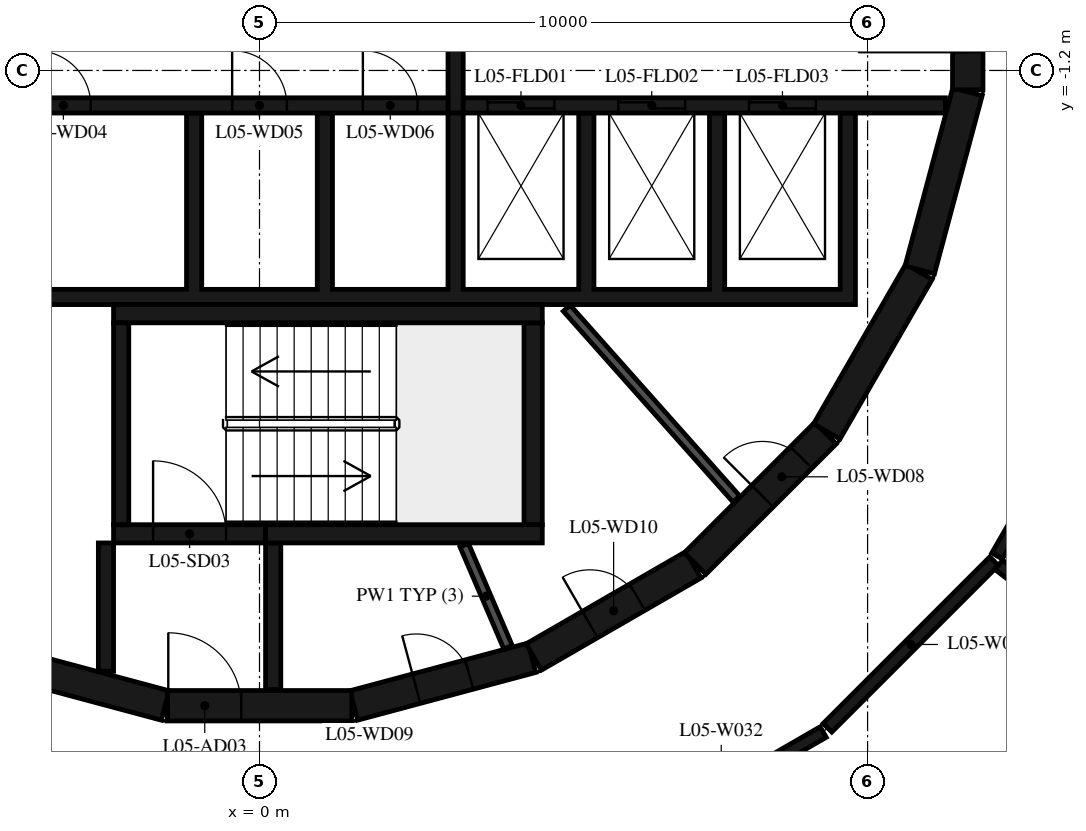
"""IFC4 building model, lengths in metres.
Left out: names, types, materials, properties, quantities, classifications, styles, units other than length and angle.
Written with IfcOpenShell. Run it as: python <this file> out.ifc"""

import sys

from ifc_helpers import new_model, si_unit, direction, frame, frame_2d, origin, place, context, subcontext, project, spatial, polyline, rectangle, outline, extrude, element, fill, save


model = new_model("IFC4")
c1 = context("Model", 3, precision=1e-05, world=origin(), true_north=direction((0.0, 1.0)))
c2 = subcontext(c1, "Body", "Model", "MODEL_VIEW")
j1 = project(units=[si_unit("LENGTHUNIT", "METRE"), si_unit("PLANEANGLEUNIT", "RADIAN")], contexts=[c1])
p1 = place(None, origin())
s1 = spatial("IfcSite", under=j1, at=p1, CompositionType="ELEMENT")
p2 = place(p1, origin())
s2 = spatial("IfcBuilding", under=s1, at=p2, CompositionType="ELEMENT")
p3 = place(p2, frame((0.0, 0.0, 28.2)))
s3 = spatial("IfcBuildingStorey", under=s2, at=p3, CompositionType="ELEMENT", Elevation=28.2)
p4 = place(p3, frame((1.55, -11.643, 0.0), z_axis=(0.0, 0.0, 1.0), x_axis=(0.965948410781, 0.258734743916, 0.0)))
e1 = element("IfcWall", 1, at=p4, inside=s3, PredefinedType="SHEAR", context=c2, shape_type="SweptSolid", body=[
    extrude(rectangle(XDim=3.033, YDim=0.5, at=frame_2d((1.516, 0.0))), origin(), (0.0, 0.0, 1.0), 4.35),
])
p5 = place(p4, frame((1.066, 0.0, 0.0)))
e2 = element("IfcOpeningElement", 2, at=p5, cuts=e1, PredefinedType="OPENING", context=c2, shape_type="SweptSolid", body=[
    extrude(rectangle(XDim=0.9, YDim=2.1, at=frame_2d((0.45, 1.05))), frame((0.0, 0.26, 0.0), z_axis=(0.0, -1.0, 0.0), x_axis=(1.0, 0.0, 0.0)), (0.0, 0.0, 1.0), 0.52),
])
p6 = place(p3, frame((4.51, -10.845, 0.0), z_axis=(0.0, 0.0, 1.0), x_axis=(0.865975092491, 0.500087131594, 0.0)))
e3 = element("IfcWall", 3, at=p6, inside=s3, PredefinedType="SHEAR", context=c2, shape_type="SweptSolid", body=[
    extrude(rectangle(XDim=3.033, YDim=0.5, at=frame_2d((1.516, 0.0))), origin(), (0.0, 0.0, 1.0), 4.35),
])
p7 = place(p6, frame((1.066, 0.0, 0.0)))
e4 = element("IfcOpeningElement", 4, at=p7, cuts=e3, PredefinedType="OPENING", context=c2, shape_type="SweptSolid", body=[
    extrude(rectangle(XDim=0.9, YDim=2.1, at=frame_2d((0.45, 1.05))), frame((0.0, 0.26, 0.0), z_axis=(0.0, -1.0, 0.0), x_axis=(1.0, 0.0, 0.0)), (0.0, 0.0, 1.0), 0.52),
])
p8 = place(p3, frame((7.164, -9.308, 0.0), z_axis=(0.0, 0.0, 1.0), x_axis=(0.707106781187, 0.707106781187, 0.0)))
e5 = element("IfcWall", 5, at=p8, inside=s3, PredefinedType="SHEAR", context=c2, shape_type="SweptSolid", body=[
    extrude(rectangle(XDim=3.032, YDim=0.5, at=frame_2d((1.516, 0.0))), origin(), (0.0, 0.0, 1.0), 4.35),
])
p9 = place(p8, frame((1.566, 0.0, 0.0)))
e6 = element("IfcOpeningElement", 6, at=p9, cuts=e5, PredefinedType="OPENING", context=c2, shape_type="SweptSolid", body=[
    extrude(rectangle(XDim=0.9, YDim=2.1, at=frame_2d((0.45, 1.05))), frame((0.0, 0.26, 0.0), z_axis=(0.0, -1.0, 0.0), x_axis=(1.0, 0.0, 0.0)), (0.0, 0.0, 1.0), 0.52),
])
for number, where, z_axis, x_axis in (
    (7, (9.329, -7.137, 0.0), (0.0, 0.0, 1.0), (0.5, 0.866, 0.0)),
    (8, (10.858, -4.479, 0.0), (0.0, 0.0, 1.0), (0.259, 0.966, 0.0)),
):
    element("IfcWall", number, at=place(p3, frame(where, z_axis=z_axis, x_axis=x_axis)), inside=s3, PredefinedType="SHEAR", context=c2, shape_type="SweptSolid", body=[
        extrude(rectangle(XDim=3.033, YDim=0.5, at=frame_2d((1.516, 0.0))), origin(), (0.0, 0.0, 1.0), 4.35),
    ])
p10 = place(p3, frame((11.647, -1.516, 0.0), z_axis=(0.0, 0.0, 1.0), x_axis=(0.0, 1.0, 0.0)))
e9 = element("IfcWall", 9, at=p10, inside=s3, PredefinedType="SHEAR", context=c2, shape_type="SweptSolid", body=[
    extrude(rectangle(XDim=3.033, YDim=0.5, at=frame_2d((1.516, 0.0))), origin(), (0.0, 0.0, 1.0), 4.35),
])
p11 = place(p10, frame((0.616, 0.0, 0.0)))
e10 = element("IfcOpeningElement", 10, at=p11, cuts=e9, PredefinedType="OPENING", context=c2, shape_type="SweptSolid", body=[
    extrude(rectangle(XDim=1.8, YDim=2.1, at=frame_2d((0.9, 1.05))), frame((0.0, 0.26, 0.0), z_axis=(0.0, -1.0, 0.0), x_axis=(1.0, 0.0, 0.0)), (0.0, 0.0, 1.0), 0.52),
])
p12 = place(p3, frame((-4.479, -10.858, 0.0), z_axis=(0.0, 0.0, 1.0), x_axis=(0.965948410781, -0.258734743916, 0.0)))
e11 = element("IfcWall", 11, at=p12, inside=s3, PredefinedType="SHEAR", context=c2, shape_type="SweptSolid", body=[
    extrude(rectangle(XDim=3.033, YDim=0.5, at=frame_2d((1.516, 0.0))), origin(), (0.0, 0.0, 1.0), 4.35),
])
p13 = place(p3, frame((-1.516, -11.647, 0.0), z_axis=(0.0, 0.0, 1.0), x_axis=(1.0, 0.0, 0.0)))
e12 = element("IfcWall", 12, at=p13, inside=s3, PredefinedType="SHEAR", context=c2, shape_type="SweptSolid", body=[
    extrude(rectangle(XDim=3.033, YDim=0.5, at=frame_2d((1.516, 0.0))), origin(), (0.0, 0.0, 1.0), 4.35),
])
p14 = place(p13, frame((0.016, 0.0, 0.0)))
e13 = element("IfcOpeningElement", 13, at=p14, cuts=e12, PredefinedType="OPENING", context=c2, shape_type="SweptSolid", body=[
    extrude(rectangle(XDim=1.2, YDim=2.1, at=frame_2d((0.6, 1.05))), frame((0.0, 0.26, 0.0), z_axis=(0.0, -1.0, 0.0), x_axis=(1.0, 0.0, 0.0)), (0.0, 0.0, 1.0), 0.52),
])
p15 = place(p3, frame((-2.275, -8.67, 0.0), z_axis=(0.0, 0.0, 1.0), x_axis=(0.0, 1.0, 0.0)))
e14 = element("IfcWall", 14, at=p15, inside=s3, PredefinedType="SHEAR", context=c2, shape_type="SweptSolid", body=[
    extrude(rectangle(XDim=3.32, YDim=0.25, at=frame_2d((1.66, 0.0))), origin(), (0.0, 0.0, 1.0), 4.35),
])
p16 = place(p3, frame((-2.4, -5.2, 0.0), z_axis=(0.0, 0.0, 1.0), x_axis=(1.0, 0.0, 0.0)))
e15 = element("IfcWall", 15, at=p16, inside=s3, PredefinedType="SHEAR", context=c2, shape_type="SweptSolid", body=[
    extrude(rectangle(XDim=7.05, YDim=0.3, at=frame_2d((3.525, 0.0))), origin(), (0.0, 0.0, 1.0), 4.35),
])
p17 = place(p3, frame((4.5, -8.67, 0.0), z_axis=(0.0, 0.0, 1.0), x_axis=(0.0, 1.0, 0.0)))
e16 = element("IfcWall", 16, at=p17, inside=s3, PredefinedType="SHEAR", context=c2, shape_type="SweptSolid", body=[
    extrude(rectangle(XDim=3.32, YDim=0.3, at=frame_2d((1.66, 0.0))), origin(), (0.0, 0.0, 1.0), 4.35),
])
p18 = place(p3, frame((0.1, -8.82, 0.0), z_axis=(0.0, 0.0, 1.0), x_axis=(1.0, 0.0, 0.0)))
e17 = element("IfcWall", 17, at=p18, inside=s3, PredefinedType="SHEAR", context=c2, shape_type="SweptSolid", body=[
    extrude(rectangle(XDim=4.55, YDim=0.3, at=frame_2d((2.275, 0.0))), origin(), (0.0, 0.0, 1.0), 4.35),
])
p19 = place(p3, frame((-2.4, -8.82, 0.0), z_axis=(0.0, 0.0, 1.0), x_axis=(1.0, 0.0, 0.0)))
e18 = element("IfcWall", 18, at=p19, inside=s3, PredefinedType="SHEAR", context=c2, shape_type="SweptSolid", body=[
    extrude(rectangle(XDim=2.5, YDim=0.3, at=frame_2d((1.25, 0.0))), origin(), (0.0, 0.0, 1.0), 4.35),
])
p20 = place(p19, frame((0.65, 0.0, 0.0)))
e19 = element("IfcOpeningElement", 19, at=p20, cuts=e18, PredefinedType="OPENING", context=c2, shape_type="SweptSolid", body=[
    extrude(rectangle(XDim=1.2, YDim=2.1, at=frame_2d((0.6, 1.05))), frame((0.0, 0.16, 0.0), z_axis=(0.0, -1.0, 0.0), x_axis=(1.0, 0.0, 0.0)), (0.0, 0.0, 1.0), 0.32),
])
p21 = place(p3, frame((-2.525, -8.97, 0.0), z_axis=(0.0, 0.0, 1.0), x_axis=(0.0, -1.0, 0.0)))
e20 = element("IfcWall", 20, at=p21, inside=s3, PredefinedType="SHEAR", context=c2, shape_type="SweptSolid", body=[
    extrude(rectangle(XDim=2.11, YDim=0.25, at=frame_2d((1.055, 0.0))), origin(), (0.0, 0.0, 1.0), 4.35),
])
p22 = place(p3, frame((0.225, -8.97, 0.0), z_axis=(0.0, 0.0, 1.0), x_axis=(0.0, -1.0, 0.0)))
e21 = element("IfcWall", 21, at=p22, inside=s3, PredefinedType="SHEAR", context=c2, shape_type="SweptSolid", body=[
    extrude(rectangle(XDim=2.41, YDim=0.25, at=frame_2d((1.205, 0.0))), origin(), (0.0, 0.0, 1.0), 4.35),
])
p23 = place(p3, origin())
e22 = element("IfcWall", 22, at=p23, inside=s3, PredefinedType="SHEAR", context=c2, shape_type="SweptSolid", body=[
    extrude(outline(polyline([(9.8, -5.05), (9.8, -4.8), (9.8, -1.9), (9.55, -1.9), (9.55, -4.8), (7.65, -4.8), (7.65, -1.9), (7.4, -1.9), (7.4, -4.8), (5.5, -4.8), (5.5, -1.9), (5.25, -1.9), (5.25, -4.8), (3.35, -4.8), (3.35, -1.9), (3.1, -1.9), (3.1, -4.8), (1.2, -4.8), (1.2, -1.9), (0.95, -1.9), (0.95, -4.8), (-0.95, -4.8), (-0.95, -1.9), (-1.2, -1.9), (-1.2, -4.8), (-5.25, -4.8), (-5.25, -1.9), (-5.5, -1.9), (-5.5, -4.8), (-7.4, -4.8), (-7.4, -1.9), (-7.65, -1.9), (-7.65, -4.8), (-9.55, -4.8), (-9.55, -1.9), (-9.8, -1.9), (-9.8, -4.8), (-9.8, -5.05), (9.8, -5.05)])), origin(), (0.0, 0.0, 1.0), 4.35),
])
p24 = place(p3, frame((-11.28, -1.775, 0.0), z_axis=(0.0, 0.0, 1.0), x_axis=(1.0, 0.0, 0.0)))
e23 = element("IfcWall", 23, at=p24, inside=s3, PredefinedType="SHEAR", context=c2, shape_type="SweptSolid", body=[
    extrude(rectangle(XDim=14.38, YDim=0.25, at=frame_2d((7.19, 0.0))), origin(), (0.0, 0.0, 1.0), 4.35),
])
p25 = place(p24, frame((7.605, 0.0, 0.0)))
e24 = element("IfcOpeningElement", 24, at=p25, cuts=e23, PredefinedType="OPENING", context=c2, shape_type="SweptSolid", body=[
    extrude(rectangle(XDim=0.9, YDim=2.1, at=frame_2d((0.45, 1.05))), frame((0.0, 0.135, 0.0), z_axis=(0.0, -1.0, 0.0), x_axis=(1.0, 0.0, 0.0)), (0.0, 0.0, 1.0), 0.27),
])
p26 = place(p24, frame((10.83, 0.0, 0.0)))
e25 = element("IfcOpeningElement", 25, at=p26, cuts=e23, PredefinedType="OPENING", context=c2, shape_type="SweptSolid", body=[
    extrude(rectangle(XDim=0.9, YDim=2.1, at=frame_2d((0.45, 1.05))), frame((0.0, 0.135, 0.0), z_axis=(0.0, -1.0, 0.0), x_axis=(1.0, 0.0, 0.0)), (0.0, 0.0, 1.0), 0.27),
])
p27 = place(p24, frame((12.98, 0.0, 0.0)))
e26 = element("IfcOpeningElement", 26, at=p27, cuts=e23, PredefinedType="OPENING", context=c2, shape_type="SweptSolid", body=[
    extrude(rectangle(XDim=0.9, YDim=2.1, at=frame_2d((0.45, 1.05))), frame((0.0, 0.135, 0.0), z_axis=(0.0, -1.0, 0.0), x_axis=(1.0, 0.0, 0.0)), (0.0, 0.0, 1.0), 0.27),
])
p28 = place(p3, frame((3.35, -1.775, 0.0), z_axis=(0.0, 0.0, 1.0), x_axis=(1.0, 0.0, 0.0)))
e27 = element("IfcWall", 27, at=p28, inside=s3, PredefinedType="SHEAR", context=c2, shape_type="SweptSolid", body=[
    extrude(rectangle(XDim=7.93, YDim=0.25, at=frame_2d((3.965, 0.0))), origin(), (0.0, 0.0, 1.0), 4.35),
])
p29 = place(p28, frame((0.4, 0.0, 0.0)))
e28 = element("IfcOpeningElement", 28, at=p29, cuts=e27, PredefinedType="OPENING", context=c2, shape_type="SweptSolid", body=[
    extrude(rectangle(XDim=1.1, YDim=2.4, at=frame_2d((0.55, 1.2))), frame((0.0, 0.135, 0.0), z_axis=(0.0, -1.0, 0.0), x_axis=(1.0, 0.0, 0.0)), (0.0, 0.0, 1.0), 0.27),
])
p30 = place(p28, frame((2.55, 0.0, 0.0)))
e29 = element("IfcOpeningElement", 29, at=p30, cuts=e27, PredefinedType="OPENING", context=c2, shape_type="SweptSolid", body=[
    extrude(rectangle(XDim=1.1, YDim=2.4, at=frame_2d((0.55, 1.2))), frame((0.0, 0.135, 0.0), z_axis=(0.0, -1.0, 0.0), x_axis=(1.0, 0.0, 0.0)), (0.0, 0.0, 1.0), 0.27),
])
p31 = place(p28, frame((4.7, 0.0, 0.0)))
e30 = element("IfcOpeningElement", 30, at=p31, cuts=e27, PredefinedType="OPENING", context=c2, shape_type="SweptSolid", body=[
    extrude(rectangle(XDim=1.1, YDim=2.4, at=frame_2d((0.55, 1.2))), frame((0.0, 0.135, 0.0), z_axis=(0.0, -1.0, 0.0), x_axis=(1.0, 0.0, 0.0)), (0.0, 0.0, 1.0), 0.27),
])
p32 = place(p3, frame((3.225, -1.9, 0.0), z_axis=(0.0, 0.0, 1.0), x_axis=(0.0, 1.0, 0.0)))
e31 = element("IfcWall", 31, at=p32, inside=s3, PredefinedType="SHEAR", context=c2, shape_type="SweptSolid", body=[
    extrude(rectangle(XDim=3.8, YDim=0.25, at=frame_2d((1.9, 0.0))), origin(), (0.0, 0.0, 1.0), 4.35),
])
p33 = place(p3, frame((7.842, -8.248, 0.0), z_axis=(0.0, 0.0, 1.0), x_axis=(-0.66446128181, 0.747322691329, 0.0)))
e32 = element("IfcWall", 32, at=p33, inside=s3, PredefinedType="PARTITIONING", context=c2, shape_type="SweptSolid", body=[
    extrude(rectangle(XDim=4.198, YDim=0.15, at=frame_2d((2.099, 0.0))), origin(), (0.0, 0.0, 1.0), 4.35),
])
p34 = place(p3, frame((3.367, -9.007, 0.0), z_axis=(0.0, 0.0, 1.0), x_axis=(0.394387482265, -0.918944238696, 0.0)))
e33 = element("IfcWall", 33, at=p34, inside=s3, PredefinedType="PARTITIONING", context=c2, shape_type="SweptSolid", body=[
    extrude(rectangle(XDim=1.825, YDim=0.15, at=frame_2d((0.913, 0.0))), origin(), (0.0, 0.0, 1.0), 4.35),
])
p35 = place(p3, frame((5.917, -14.02, 0.0), z_axis=(0.0, 0.0, 1.0), x_axis=(0.865601686425, 0.500733182901, 0.0)))
e34 = element("IfcWall", 34, at=p35, inside=s3, PredefinedType="PARTITIONING", context=c2, shape_type="SweptSolid", body=[
    extrude(rectangle(XDim=3.874, YDim=0.2, at=frame_2d((1.937, 0.0))), origin(), (0.0, 0.0, 1.0), 4.35),
])
p36 = place(p3, frame((9.341, -12.009, 0.0), z_axis=(0.0, 0.0, 1.0), x_axis=(0.707106781187, 0.707106781187, 0.0)))
e35 = element("IfcWall", 35, at=p36, inside=s3, PredefinedType="PARTITIONING", context=c2, shape_type="SweptSolid", body=[
    extrude(rectangle(XDim=3.874, YDim=0.2, at=frame_2d((1.937, 0.0))), origin(), (0.0, 0.0, 1.0), 4.35),
])
p37 = place(p3, frame((12.13, -9.183, 0.0), z_axis=(0.0, 0.0, 1.0), x_axis=(0.500760497952, 0.865585884642, 0.0)))
e36 = element("IfcWall", 36, at=p37, inside=s3, PredefinedType="PARTITIONING", context=c2, shape_type="SweptSolid", body=[
    extrude(rectangle(XDim=3.874, YDim=0.2, at=frame_2d((1.937, 0.0))), origin(), (0.0, 0.0, 1.0), 4.35),
])
p38 = place(p3, frame((12.159, -9.331, 0.0), z_axis=(0.0, 0.0, 1.0), x_axis=(0.793226820575, -0.608926277246, 0.0)))
e37 = element("IfcWall", 37, at=p38, inside=s3, PredefinedType="PARTITIONING", context=c2, shape_type="SweptSolid", body=[
    extrude(rectangle(XDim=15.091, YDim=0.2, at=frame_2d((7.545, 0.0))), origin(), (0.0, 0.0, 1.0), 4.35),
])
p39 = place(p20, origin())
e38 = element("IfcDoor", 38, at=p39, inside=s3, OperationType="SINGLE_SWING_LEFT", PredefinedType="DOOR", context=c2, shape_type="SweptSolid", body=[
    extrude(rectangle(XDim=1.2, YDim=2.1, at=frame_2d((0.6, 1.05))), frame((0.0, 0.025, 0.0), z_axis=(0.0, -1.0, 0.0), x_axis=(1.0, 0.0, 0.0)), (0.0, 0.0, 1.0), 0.05),
])
fill(e19, e38)
p40 = place(p14, origin())
e39 = element("IfcDoor", 39, at=p40, inside=s3, OperationType="SINGLE_SWING_RIGHT", PredefinedType="DOOR", context=c2, shape_type="SweptSolid", body=[
    extrude(rectangle(XDim=1.2, YDim=2.1, at=frame_2d((0.6, 1.05))), frame((0.0, 0.025, 0.0), z_axis=(0.0, -1.0, 0.0), x_axis=(1.0, 0.0, 0.0)), (0.0, 0.0, 1.0), 0.05),
])
fill(e13, e39)
p41 = place(p11, origin())
e40 = element("IfcDoor", 40, at=p41, inside=s3, OperationType="DOUBLE_DOOR_SINGLE_SWING", PredefinedType="DOOR", context=c2, shape_type="SweptSolid", body=[
    extrude(rectangle(XDim=1.8, YDim=2.1, at=frame_2d((0.9, 1.05))), frame((0.0, 0.025, 0.0), z_axis=(0.0, -1.0, 0.0), x_axis=(1.0, 0.0, 0.0)), (0.0, 0.0, 1.0), 0.05),
])
fill(e10, e40)
p42 = place(p29, origin())
e41 = element("IfcDoor", 41, at=p42, inside=s3, OperationType="DOUBLE_DOOR_SLIDING", PredefinedType="DOOR", context=c2, shape_type="SweptSolid", body=[
    extrude(rectangle(XDim=1.1, YDim=2.4, at=frame_2d((0.55, 1.2))), frame((0.0, 0.025, 0.0), z_axis=(0.0, -1.0, 0.0), x_axis=(1.0, 0.0, 0.0)), (0.0, 0.0, 1.0), 0.05),
])
fill(e28, e41)
p43 = place(p30, origin())
e42 = element("IfcDoor", 42, at=p43, inside=s3, OperationType="DOUBLE_DOOR_SLIDING", PredefinedType="DOOR", context=c2, shape_type="SweptSolid", body=[
    extrude(rectangle(XDim=1.1, YDim=2.4, at=frame_2d((0.55, 1.2))), frame((0.0, 0.025, 0.0), z_axis=(0.0, -1.0, 0.0), x_axis=(1.0, 0.0, 0.0)), (0.0, 0.0, 1.0), 0.05),
])
fill(e29, e42)
p44 = place(p31, origin())
e43 = element("IfcDoor", 43, at=p44, inside=s3, OperationType="DOUBLE_DOOR_SLIDING", PredefinedType="DOOR", context=c2, shape_type="SweptSolid", body=[
    extrude(rectangle(XDim=1.1, YDim=2.4, at=frame_2d((0.55, 1.2))), frame((0.0, 0.025, 0.0), z_axis=(0.0, -1.0, 0.0), x_axis=(1.0, 0.0, 0.0)), (0.0, 0.0, 1.0), 0.05),
])
fill(e30, e43)
p45 = place(p25, origin())
e44 = element("IfcDoor", 44, at=p45, inside=s3, OperationType="SINGLE_SWING_LEFT", PredefinedType="DOOR", context=c2, shape_type="SweptSolid", body=[
    extrude(rectangle(XDim=0.9, YDim=2.1, at=frame_2d((0.45, 1.05))), frame((0.0, 0.025, 0.0), z_axis=(0.0, -1.0, 0.0), x_axis=(1.0, 0.0, 0.0)), (0.0, 0.0, 1.0), 0.05),
])
fill(e24, e44)
p46 = place(p26, origin())
e45 = element("IfcDoor", 45, at=p46, inside=s3, OperationType="SINGLE_SWING_RIGHT", PredefinedType="DOOR", context=c2, shape_type="SweptSolid", body=[
    extrude(rectangle(XDim=0.9, YDim=2.1, at=frame_2d((0.45, 1.05))), frame((0.0, 0.025, 0.0), z_axis=(0.0, -1.0, 0.0), x_axis=(1.0, 0.0, 0.0)), (0.0, 0.0, 1.0), 0.05),
])
fill(e25, e45)
p47 = place(p27, origin())
e46 = element("IfcDoor", 46, at=p47, inside=s3, OperationType="SINGLE_SWING_LEFT", PredefinedType="DOOR", context=c2, shape_type="SweptSolid", body=[
    extrude(rectangle(XDim=0.9, YDim=2.1, at=frame_2d((0.45, 1.05))), frame((0.0, 0.025, 0.0), z_axis=(0.0, -1.0, 0.0), x_axis=(1.0, 0.0, 0.0)), (0.0, 0.0, 1.0), 0.05),
])
fill(e26, e46)
p48 = place(p9, origin())
e47 = element("IfcDoor", 47, at=p48, inside=s3, OperationType="SINGLE_SWING_LEFT", PredefinedType="DOOR", context=c2, shape_type="SweptSolid", body=[
    extrude(rectangle(XDim=0.9, YDim=2.1, at=frame_2d((0.45, 1.05))), frame((0.0, 0.025, 0.0), z_axis=(0.0, -1.0, 0.0), x_axis=(1.0, 0.0, 0.0)), (0.0, 0.0, 1.0), 0.05),
])
fill(e6, e47)
p49 = place(p5, origin())
e48 = element("IfcDoor", 48, at=p49, inside=s3, OperationType="SINGLE_SWING_RIGHT", PredefinedType="DOOR", context=c2, shape_type="SweptSolid", body=[
    extrude(rectangle(XDim=0.9, YDim=2.1, at=frame_2d((0.45, 1.05))), frame((0.0, 0.025, 0.0), z_axis=(0.0, -1.0, 0.0), x_axis=(1.0, 0.0, 0.0)), (0.0, 0.0, 1.0), 0.05),
])
fill(e2, e48)
p50 = place(p7, origin())
e49 = element("IfcDoor", 49, at=p50, inside=s3, OperationType="SINGLE_SWING_LEFT", PredefinedType="DOOR", context=c2, shape_type="SweptSolid", body=[
    extrude(rectangle(XDim=0.9, YDim=2.1, at=frame_2d((0.45, 1.05))), frame((0.0, 0.025, 0.0), z_axis=(0.0, -1.0, 0.0), x_axis=(1.0, 0.0, 0.0)), (0.0, 0.0, 1.0), 0.05),
])
fill(e4, e49)
save(model, sys.argv[1])
